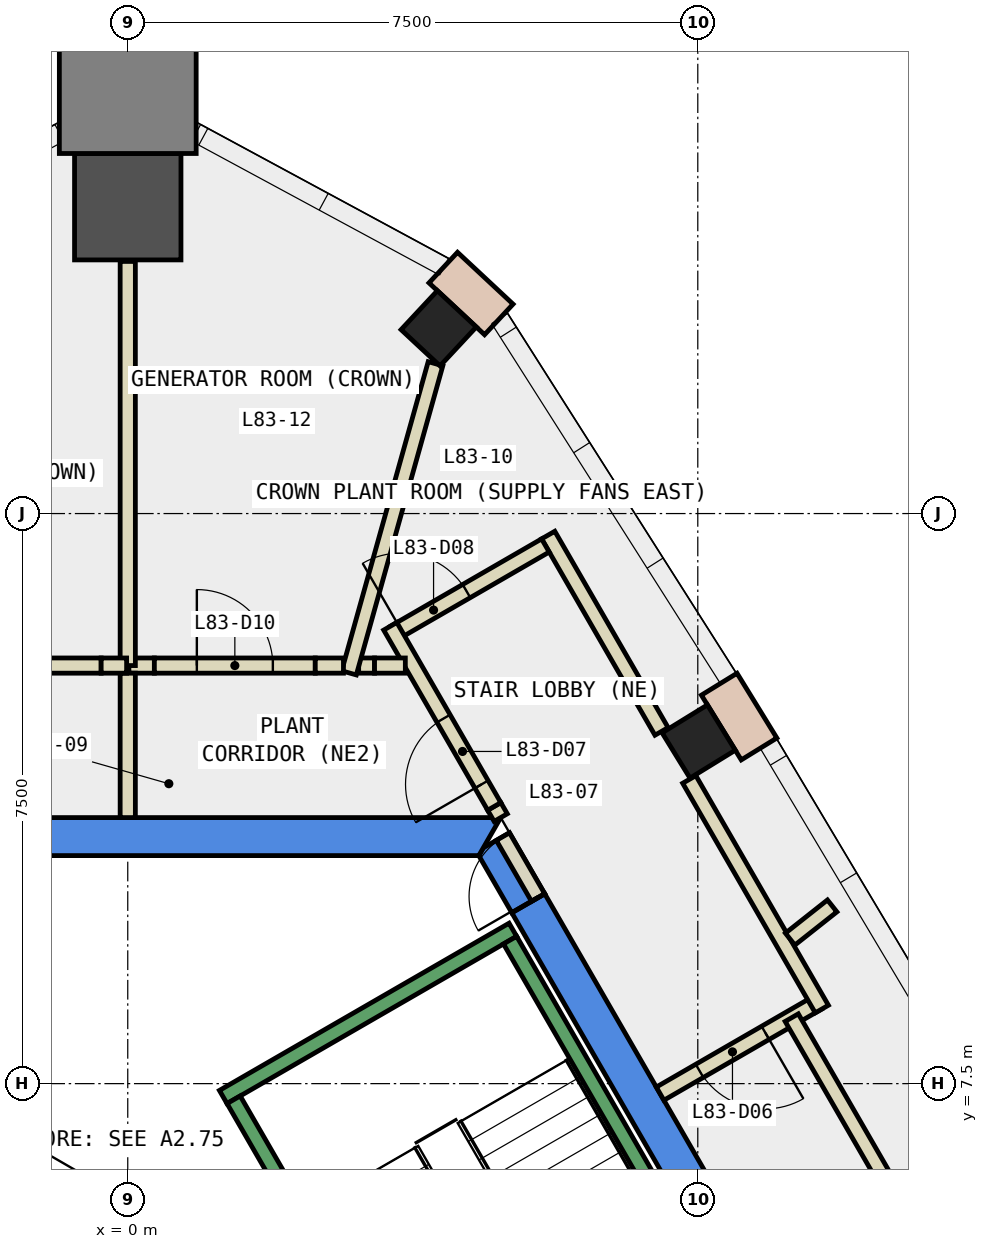
"""IFC4 building model, lengths in metres.
Left out: names, types, materials, properties, quantities, classifications, styles, units other than length and angle.
Written with IfcOpenShell. Run it as: python <this file> out.ifc"""

import sys

from ifc_helpers import new_model, si_unit, direction, frame, frame_2d, origin, origin_2d, place, context, subcontext, project, spatial, polyline, rectangle, outline, extrude, element, fill, save


model = new_model("IFC4")
c1 = context("Model", 3, precision=1e-05, world=origin(), true_north=direction((0.0, 1.0)))
c2 = subcontext(c1, "Body", "Model", "MODEL_VIEW")
j1 = project(units=[si_unit("LENGTHUNIT", "METRE"), si_unit("PLANEANGLEUNIT", "RADIAN")], contexts=[c1])
p1 = place(None, origin())
s1 = spatial("IfcSite", under=j1, at=p1, CompositionType="ELEMENT")
p2 = place(p1, origin())
s2 = spatial("IfcBuilding", under=s1, at=p2, CompositionType="ELEMENT")
p3 = place(p2, frame((0.0, 0.0, 353.9)))
s3 = spatial("IfcBuildingStorey", under=s2, at=p3, CompositionType="ELEMENT", Elevation=353.9)
for number, where, z_axis, x_axis in (
    (1, (7.512, 12.001, -0.35), (0.0, 0.0, 1.0), (-0.524, 0.851, 0.0)),
    (2, (4.091, 17.437, -0.35), (0.0, 0.0, 1.0), (-0.732, 0.682, 0.0)),
):
    element("IfcColumn", number, at=place(p3, frame(where, z_axis=z_axis, x_axis=x_axis)), inside=s3, PredefinedType="COLUMN", context=c2, shape_type="SweptSolid", body=[
        extrude(rectangle(XDim=0.7, YDim=0.7, at=origin_2d()), origin(), (0.0, 0.0, 1.0), 4.4),
    ])
p4 = place(p3, frame((0.0, 19.037, -0.35), z_axis=(0.0, 0.0, 1.0), x_axis=(0.0, 1.0, 0.0)))
e3 = element("IfcColumn", 3, at=p4, inside=s3, PredefinedType="COLUMN", context=c2, shape_type="SweptSolid", body=[
    extrude(rectangle(XDim=1.4, YDim=1.4, at=origin_2d()), origin(), (0.0, 0.0, 1.0), 4.4),
])
p5 = place(p3, frame((0.0, 20.637, -0.35), z_axis=(0.0, 0.0, 1.0), x_axis=(0.0, 1.0, 0.0)))
e4 = element("IfcColumn", 4, at=p5, inside=s3, PredefinedType="COLUMN", context=c2, shape_type="SweptSolid", body=[
    extrude(rectangle(XDim=1.8, YDim=1.8, at=origin_2d()), origin(), (0.0, 0.0, 1.0), 4.4),
])
p6 = place(p3, frame((0.0, 0.0, -0.35)))
e5 = element("IfcWall", 5, at=p6, inside=s3, PredefinedType="SHEAR", context=c2, shape_type="SweptSolid", body=[
    extrude(outline(polyline([(5.486, 9.998), (5.053, 9.748), (9.238, 2.5), (9.815, 2.5), (5.486, 9.998)])), origin(), (0.0, 0.0, 1.0), 4.4),
])
p7 = place(p3, frame((0.0, 0.0, 3.6)))
e6 = element("IfcWall", 6, at=p7, inside=s3, PredefinedType="SHEAR", context=c2, shape_type="SweptSolid", body=[
    extrude(outline(polyline([(5.022, 10.8), (4.677, 10.601), (4.619, 10.5), (5.053, 9.748), (5.486, 9.998), (5.022, 10.8)])), origin(), (0.0, 0.0, 1.0), 0.45),
])
p8 = place(p3, frame((0.0, 0.0, -0.35)))
e7 = element("IfcWall", 7, at=p8, inside=s3, PredefinedType="SHEAR", context=c2, shape_type="SweptSolid", body=[
    extrude(outline(polyline([(4.907, 11.0), (-4.907, 11.0), (-4.619, 10.5), (4.619, 10.5), (4.907, 11.0)])), origin(), (0.0, 0.0, 1.0), 4.4),
])
for number, where, z_axis, x_axis in (
    (8, (8.306, 11.903, 0.0), (0.0, 0.0, 1.0), (-0.524, 0.852, 0.0)),
    (9, (4.882, 17.554, 0.0), (0.0, 0.0, 1.0), (-0.731, 0.682, 0.0)),
):
    element("IfcWall", number, at=place(p3, frame(where, z_axis=z_axis, x_axis=x_axis)), inside=s3, PredefinedType="STANDARD", context=c2, shape_type="SweptSolid", body=[
        extrude(rectangle(XDim=1.0, YDim=0.55, at=frame_2d((0.5, 0.0))), origin(), (0.0, 0.0, 1.0), 4.05),
    ])
p9 = place(p3, frame((9.082, 8.568, 0.0), z_axis=(0.0, 0.0, 1.0), x_axis=(-0.865955154139, -0.50012165622, 0.0)))
e10 = element("IfcWall", 10, at=p9, inside=s3, PredefinedType="PARTITIONING", context=c2, shape_type="SweptSolid", body=[
    extrude(rectangle(XDim=2.4, YDim=0.2, at=frame_2d((1.2, 0.0))), origin(), (0.0, 0.0, 1.0), 4.05),
])
p10 = place(p9, frame((0.8, 0.0, 0.0)))
e11 = element("IfcOpeningElement", 11, at=p10, cuts=e10, PredefinedType="OPENING", context=c2, shape_type="SweptSolid", body=[
    extrude(rectangle(XDim=1.0, YDim=2.1, at=frame_2d((0.5, 1.05))), frame((0.0, 0.11, 0.0), z_axis=(0.0, -1.0, 0.0), x_axis=(1.0, 0.0, 0.0)), (0.0, 0.0, 1.0), 0.22),
])
p11 = place(p3, frame((4.907, 11.0, 0.0), z_axis=(0.0, 0.0, 1.0), x_axis=(-0.5004692653, 0.865754303766, 0.0)))
e12 = element("IfcWall", 12, at=p11, inside=s3, PredefinedType="PARTITIONING", context=c2, shape_type="SweptSolid", body=[
    extrude(rectangle(XDim=0.17, YDim=0.2, at=frame_2d((0.085, 0.0))), origin(), (0.0, 0.0, 1.0), 2.4),
])
p12 = place(p3, frame((5.532, 14.717, 0.0), z_axis=(0.0, 0.0, 1.0), x_axis=(0.499916141899, -0.866073813868, 0.0)))
e13 = element("IfcWall", 13, at=p12, inside=s3, PredefinedType="PARTITIONING", context=c2, shape_type="SweptSolid", body=[
    extrude(rectangle(XDim=2.982, YDim=0.2, at=frame_2d((1.491, 0.0))), origin(), (0.0, 0.0, 1.0), 1.95),
])
p13 = place(p3, frame((7.388, 11.502, 0.0), z_axis=(0.0, 0.0, 1.0), x_axis=(0.499993059066, -0.866029411098, 0.0)))
e14 = element("IfcWall", 14, at=p13, inside=s3, PredefinedType="PARTITIONING", context=c2, shape_type="SweptSolid", body=[
    extrude(rectangle(XDim=3.488, YDim=0.2, at=frame_2d((1.744, 0.0))), origin(), (0.0, 0.0, 1.0), 1.95),
])
p14 = place(p3, frame((3.504, 13.43, 0.0), z_axis=(0.0, 0.0, 1.0), x_axis=(0.865927408828, 0.500169693844, 0.0)))
e15 = element("IfcWall", 15, at=p14, inside=s3, PredefinedType="PARTITIONING", context=c2, shape_type="SweptSolid", body=[
    extrude(rectangle(XDim=2.3, YDim=0.2, at=frame_2d((1.15, 0.0))), origin(), (0.0, 0.0, 1.0), 4.05),
])
p15 = place(p14, frame((0.1, 0.0, 0.0)))
e16 = element("IfcOpeningElement", 16, at=p15, cuts=e15, PredefinedType="OPENING", context=c2, shape_type="SweptSolid", body=[
    extrude(rectangle(XDim=1.0, YDim=2.1, at=frame_2d((0.5, 1.05))), frame((0.0, 0.11, 0.0), z_axis=(0.0, -1.0, 0.0), x_axis=(1.0, 0.0, 0.0)), (0.0, 0.0, 1.0), 0.22),
])
p16 = place(p3, frame((8.736, 8.368, 0.0), z_axis=(0.0, 0.0, 1.0), x_axis=(0.499945030264, -0.86605713825, 0.0)))
e17 = element("IfcWall", 17, at=p16, inside=s3, PredefinedType="PARTITIONING", context=c2, shape_type="SweptSolid", body=[
    extrude(rectangle(XDim=2.532, YDim=0.2, at=frame_2d((1.266, 0.0))), origin(), (0.0, 0.0, 1.0), 4.05),
])
p17 = place(p3, frame((3.038, 13.0, 0.0), z_axis=(0.0, 0.0, 1.0), x_axis=(1.0, 0.0, 0.0)))
e18 = element("IfcWall", 18, at=p17, inside=s3, PredefinedType="PARTITIONING", context=c2, shape_type="SweptSolid", body=[
    extrude(rectangle(XDim=0.209, YDim=0.2, at=frame_2d((0.104, 0.0))), origin(), (0.0, 0.0, 1.0), 1.95),
])
p18 = place(p3, frame((0.015, 13.0, 0.0), z_axis=(0.0, 0.0, 1.0), x_axis=(1.0, 0.0, 0.0)))
e19 = element("IfcWall", 19, at=p18, inside=s3, PredefinedType="PARTITIONING", context=c2, shape_type="SweptSolid", body=[
    extrude(rectangle(XDim=0.335, YDim=0.2, at=frame_2d((0.167, 0.0))), origin(), (0.0, 0.0, 1.0), 1.95),
])
p19 = place(p3, frame((0.0, 11.0, 0.0), z_axis=(0.0, 0.0, 1.0), x_axis=(0.0, 1.0, 0.0)))
e20 = element("IfcWall", 20, at=p19, inside=s3, PredefinedType="PARTITIONING", context=c2, shape_type="SweptSolid", body=[
    extrude(rectangle(XDim=1.9, YDim=0.2, at=frame_2d((0.95, 0.0))), origin(), (0.0, 0.0, 1.0), 1.95),
])
p20 = place(p3, frame((9.268, 9.838, 0.0), z_axis=(0.0, 0.0, 1.0), x_axis=(-0.784572335163, -0.620037297988, 0.0)))
e21 = element("IfcWall", 21, at=p20, inside=s3, PredefinedType="PARTITIONING", context=c2, shape_type="SweptSolid", body=[
    extrude(rectangle(XDim=0.705, YDim=0.2, at=frame_2d((0.353, 0.0))), origin(), (0.0, 0.0, 1.0), 1.95),
])
p21 = place(p3, frame((2.911, 12.904, 0.0), z_axis=(0.0, 0.0, 1.0), x_axis=(0.269509843473, 0.962997634614, 0.0)))
e22 = element("IfcWall", 22, at=p21, inside=s3, PredefinedType="PARTITIONING", context=c2, shape_type="SweptSolid", body=[
    extrude(rectangle(XDim=4.223, YDim=0.2, at=frame_2d((2.112, 0.0))), origin(), (0.0, 0.0, 1.0), 1.95),
])
p22 = place(p3, frame((0.0, 13.0, 0.0), z_axis=(0.0, 0.0, 1.0), x_axis=(0.0, 1.0, 0.0)))
e23 = element("IfcWall", 23, at=p22, inside=s3, PredefinedType="PARTITIONING", context=c2, shape_type="SweptSolid", body=[
    extrude(rectangle(XDim=5.317, YDim=0.2, at=frame_2d((2.658, 0.0))), origin(), (0.0, 0.0, 1.0), 1.95),
])
p23 = place(p3, frame((5.399, 9.948, 0.0), z_axis=(0.0, 0.0, 1.0), x_axis=(-0.499882215713, 0.866093395895, 0.0)))
e24 = element("IfcWall", 24, at=p23, inside=s3, PredefinedType="PARTITIONING", context=c2, shape_type="SweptSolid", body=[
    extrude(rectangle(XDim=0.926, YDim=0.2, at=frame_2d((0.463, 0.0))), origin(), (0.0, 0.0, 1.0), 2.4),
])
p24 = place(p23, frame((0.017, 0.0, 0.0)))
e25 = element("IfcOpeningElement", 25, at=p24, cuts=e24, PredefinedType="OPENING", context=c2, shape_type="SweptSolid", body=[
    extrude(rectangle(XDim=0.9, YDim=2.1, at=frame_2d((0.45, 1.05))), frame((0.0, 0.11, 0.0), z_axis=(0.0, -1.0, 0.0), x_axis=(1.0, 0.0, 0.0)), (0.0, 0.0, 1.0), 0.22),
])
p25 = place(p3, frame((4.822, 11.147, 0.0), z_axis=(0.0, 0.0, 1.0), x_axis=(-0.499871764879, 0.866099427708, 0.0)))
e26 = element("IfcWall", 26, at=p25, inside=s3, PredefinedType="PARTITIONING", context=c2, shape_type="SweptSolid", body=[
    extrude(rectangle(XDim=2.737, YDim=0.2, at=frame_2d((1.368, 0.0))), origin(), (0.0, 0.0, 1.0), 4.05),
])
p26 = place(p25, frame((0.335, 0.0, 0.0)))
e27 = element("IfcOpeningElement", 27, at=p26, cuts=e26, PredefinedType="OPENING", context=c2, shape_type="SweptSolid", body=[
    extrude(rectangle(XDim=1.0, YDim=2.1, at=frame_2d((0.5, 1.05))), frame((0.0, 0.11, 0.0), z_axis=(0.0, -1.0, 0.0), x_axis=(1.0, 0.0, 0.0)), (0.0, 0.0, 1.0), 0.22),
])
p27 = place(p3, frame((3.247, 13.0, 0.0), z_axis=(0.0, 0.0, 1.0), x_axis=(1.0, 0.0, 0.0)))
e28 = element("IfcWall", 28, at=p27, inside=s3, PredefinedType="PARTITIONING", context=c2, shape_type="SweptSolid", body=[
    extrude(rectangle(XDim=0.405, YDim=0.2, at=frame_2d((0.203, 0.0))), origin(), (0.0, 0.0, 1.0), 4.05),
])
p28 = place(p3, frame((0.35, 13.0, 0.0), z_axis=(0.0, 0.0, 1.0), x_axis=(1.0, 0.0, 0.0)))
e29 = element("IfcWall", 29, at=p28, inside=s3, PredefinedType="PARTITIONING", context=c2, shape_type="SweptSolid", body=[
    extrude(rectangle(XDim=2.117, YDim=0.2, at=frame_2d((1.059, 0.0))), origin(), (0.0, 0.0, 1.0), 4.05),
])
p29 = place(p28, frame((0.559, 0.0, 0.0)))
e30 = element("IfcOpeningElement", 30, at=p29, cuts=e29, PredefinedType="OPENING", context=c2, shape_type="SweptSolid", body=[
    extrude(rectangle(XDim=1.0, YDim=2.1, at=frame_2d((0.5, 1.05))), frame((0.0, 0.11, 0.0), z_axis=(0.0, -1.0, 0.0), x_axis=(1.0, 0.0, 0.0)), (0.0, 0.0, 1.0), 0.22),
])
p30 = place(p3, frame((2.467, 13.0, 0.0), z_axis=(0.0, 0.0, 1.0), x_axis=(1.0, 0.0, 0.0)))
e31 = element("IfcWall", 31, at=p30, inside=s3, PredefinedType="PARTITIONING", context=c2, shape_type="SweptSolid", body=[
    extrude(rectangle(XDim=0.371, YDim=0.2, at=frame_2d((0.186, 0.0))), origin(), (0.0, 0.0, 1.0), 1.95),
])
p31 = place(p3, frame((-2.467, 13.0, 0.0), z_axis=(0.0, 0.0, 1.0), x_axis=(1.0, 0.0, 0.0)))
e32 = element("IfcWall", 32, at=p31, inside=s3, PredefinedType="PARTITIONING", context=c2, shape_type="SweptSolid", body=[
    extrude(rectangle(XDim=2.117, YDim=0.2, at=frame_2d((1.059, 0.0))), origin(), (0.0, 0.0, 1.0), 4.05),
])
p32 = place(p3, frame((-0.35, 13.0, 0.0), z_axis=(0.0, 0.0, 1.0), x_axis=(1.0, 0.0, 0.0)))
e33 = element("IfcWall", 33, at=p32, inside=s3, PredefinedType="PARTITIONING", context=c2, shape_type="SweptSolid", body=[
    extrude(rectangle(XDim=0.335, YDim=0.2, at=frame_2d((0.167, 0.0))), origin(), (0.0, 0.0, 1.0), 1.95),
])
p33 = place(p3, frame((1.256, 7.324, 0.0), z_axis=(0.0, 0.0, 1.0), x_axis=(0.866046073146, 0.499964197906, 0.0)))
e34 = element("IfcWall", 34, at=p33, inside=s3, PredefinedType="STANDARD", context=c2, shape_type="SweptSolid", body=[
    extrude(rectangle(XDim=4.4, YDim=0.2, at=frame_2d((2.2, 0.0))), origin(), (0.0, 0.0, 1.0), 4.05),
])
p34 = place(p3, frame((4.843, 1.312, 0.0), z_axis=(0.0, 0.0, 1.0), x_axis=(-0.499963383562, 0.866046543262, 0.0)))
e35 = element("IfcWall", 35, at=p34, inside=s3, PredefinedType="STANDARD", context=c2, shape_type="SweptSolid", body=[
    extrude(rectangle(XDim=6.9, YDim=0.2, at=frame_2d((3.45, 0.0))), origin(), (0.0, 0.0, 1.0), 4.05),
])
p35 = place(p34, frame((0.45, 0.0, 0.0)))
e36 = element("IfcOpeningElement", 36, at=p35, cuts=e35, PredefinedType="OPENING", context=c2, shape_type="SweptSolid", body=[
    extrude(rectangle(XDim=1.1, YDim=2.2, at=frame_2d((0.55, 1.1))), frame((0.0, 0.11, 0.0), z_axis=(0.0, -1.0, 0.0), x_axis=(1.0, 0.0, 0.0)), (0.0, 0.0, 1.0), 0.22),
])
p36 = place(p3, frame((8.48, 3.412, 0.0), z_axis=(0.0, 0.0, 1.0), x_axis=(-0.499978703459, 0.866037698999, 0.0)))
e37 = element("IfcWall", 37, at=p36, inside=s3, PredefinedType="STANDARD", context=c2, shape_type="SweptSolid", body=[
    extrude(rectangle(XDim=6.9, YDim=0.2, at=frame_2d((3.45, 0.0))), origin(), (0.0, 0.0, 1.0), 4.05),
])
p37 = place(p10, origin())
e38 = element("IfcDoor", 38, at=p37, inside=s3, OperationType="SINGLE_SWING_LEFT", PredefinedType="DOOR", context=c2, shape_type="SweptSolid", body=[
    extrude(rectangle(XDim=1.0, YDim=2.1, at=frame_2d((0.5, 1.05))), frame((0.0, 0.025, 0.0), z_axis=(0.0, -1.0, 0.0), x_axis=(1.0, 0.0, 0.0)), (0.0, 0.0, 1.0), 0.05),
])
fill(e11, e38)
p38 = place(p26, origin())
e39 = element("IfcDoor", 39, at=p38, inside=s3, OperationType="SINGLE_SWING_RIGHT", PredefinedType="DOOR", context=c2, shape_type="SweptSolid", body=[
    extrude(rectangle(XDim=1.0, YDim=2.1, at=frame_2d((0.5, 1.05))), frame((0.0, 0.025, 0.0), z_axis=(0.0, -1.0, 0.0), x_axis=(1.0, 0.0, 0.0)), (0.0, 0.0, 1.0), 0.05),
])
fill(e27, e39)
p39 = place(p15, origin())
e40 = element("IfcDoor", 40, at=p39, inside=s3, OperationType="SINGLE_SWING_LEFT", PredefinedType="DOOR", context=c2, shape_type="SweptSolid", body=[
    extrude(rectangle(XDim=1.0, YDim=2.1, at=frame_2d((0.5, 1.05))), frame((0.0, 0.025, 0.0), z_axis=(0.0, -1.0, 0.0), x_axis=(1.0, 0.0, 0.0)), (0.0, 0.0, 1.0), 0.05),
])
fill(e16, e40)
p40 = place(p29, origin())
e41 = element("IfcDoor", 41, at=p40, inside=s3, OperationType="SINGLE_SWING_LEFT", PredefinedType="DOOR", context=c2, shape_type="SweptSolid", body=[
    extrude(rectangle(XDim=1.0, YDim=2.1, at=frame_2d((0.5, 1.05))), frame((0.0, 0.025, 0.0), z_axis=(0.0, -1.0, 0.0), x_axis=(1.0, 0.0, 0.0)), (0.0, 0.0, 1.0), 0.05),
])
fill(e30, e41)
p41 = place(p24, origin())
e42 = element("IfcDoor", 42, at=p41, inside=s3, OperationType="SINGLE_SWING_LEFT", PredefinedType="DOOR", context=c2, shape_type="SweptSolid", body=[
    extrude(rectangle(XDim=0.9, YDim=2.1, at=frame_2d((0.45, 1.05))), frame((0.0, 0.025, 0.0), z_axis=(0.0, -1.0, 0.0), x_axis=(1.0, 0.0, 0.0)), (0.0, 0.0, 1.0), 0.05),
])
fill(e25, e42)
save(model, sys.argv[1])
